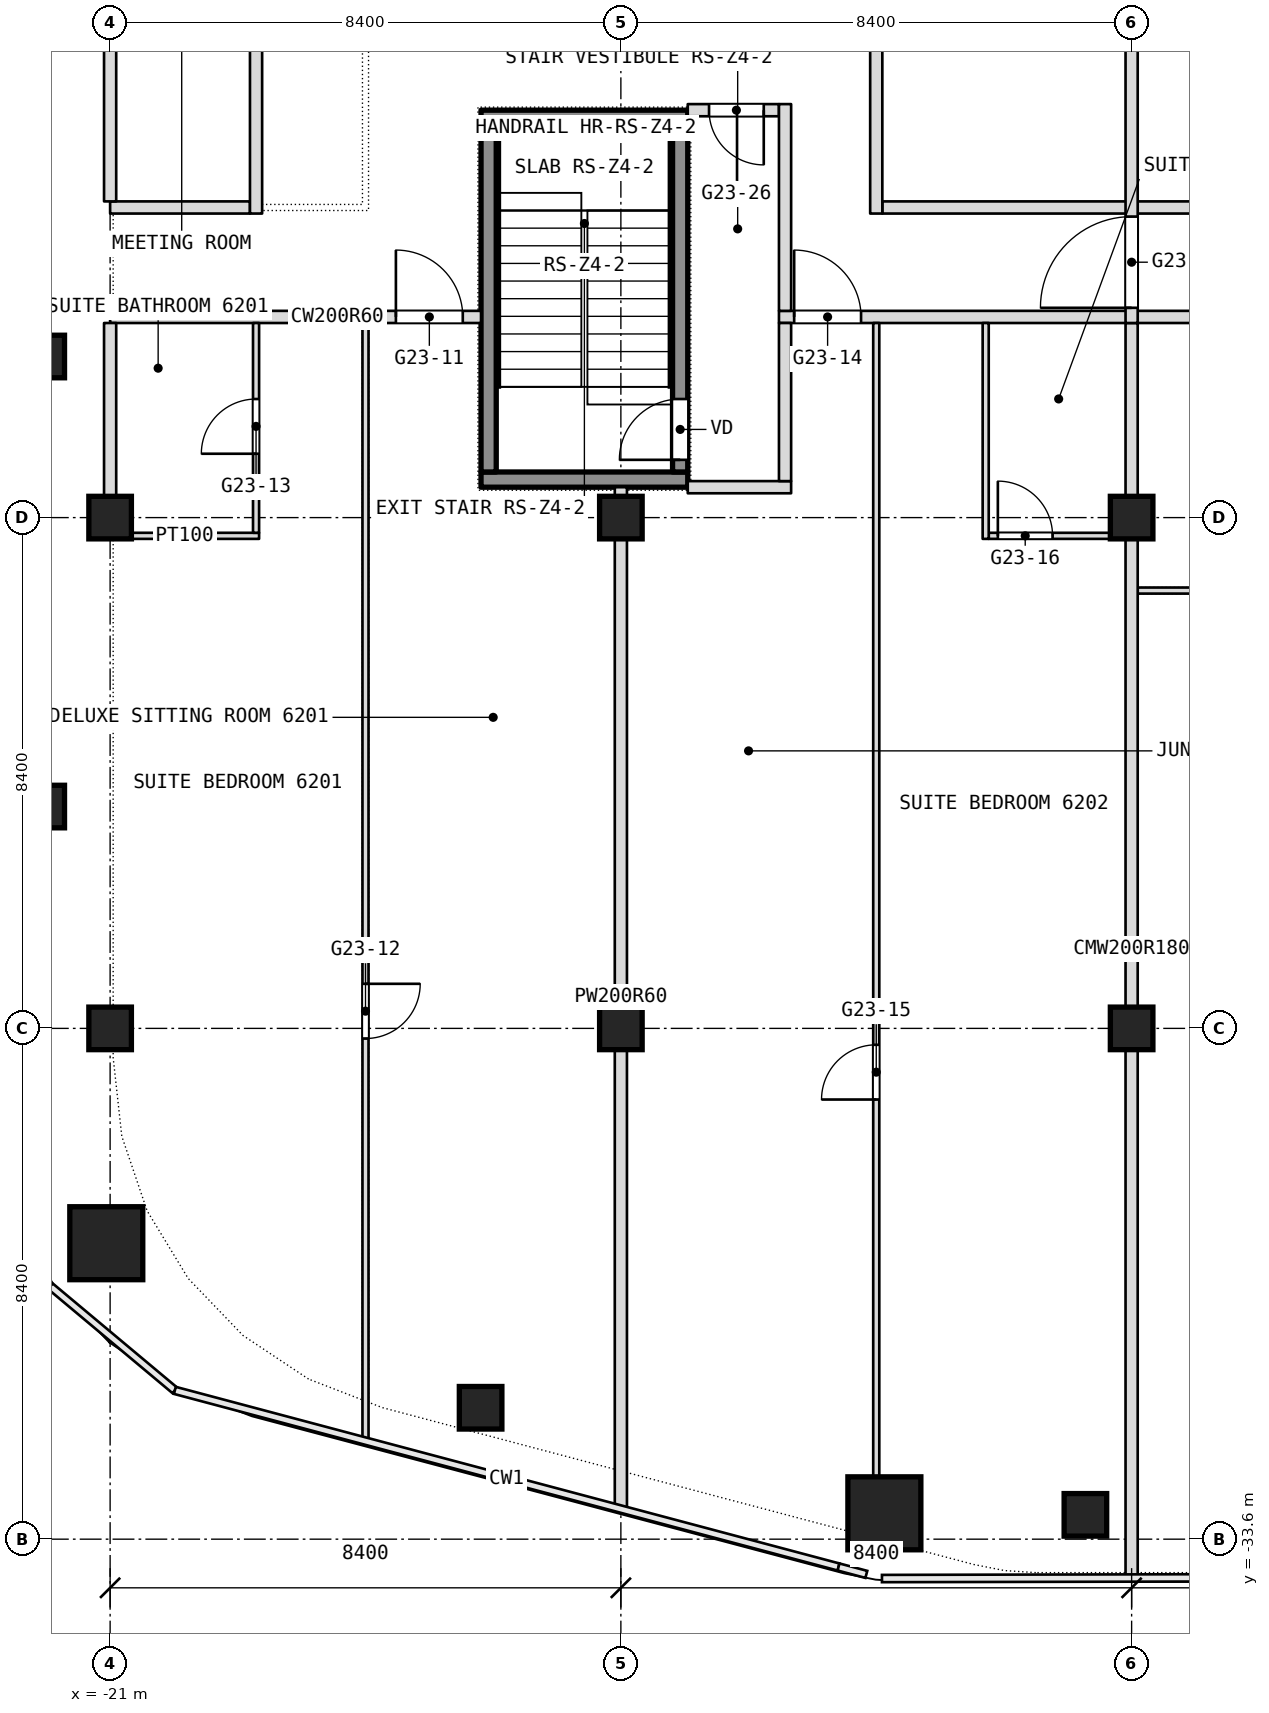
"""IFC4 building model, lengths in metres.
Left out: names, types, materials, properties, quantities, classifications, styles, units other than length and angle.
Written with IfcOpenShell. Run it as: python <this file> out.ifc"""

import sys

from ifc_helpers import new_model, si_unit, direction, frame, frame_2d, origin, origin_2d, place, context, subcontext, project, spatial, rectangle, extrude, element, fill, save


model = new_model("IFC4")
c1 = context("Model", 3, precision=1e-05, world=origin(), true_north=direction((0.0, 1.0)))
c2 = subcontext(c1, "Body", "Model", "MODEL_VIEW")
j1 = project(units=[si_unit("LENGTHUNIT", "METRE"), si_unit("PLANEANGLEUNIT", "RADIAN")], contexts=[c1])
p1 = place(None, origin())
s1 = spatial("IfcSite", under=j1, at=p1, CompositionType="ELEMENT")
p2 = place(p1, origin())
s2 = spatial("IfcBuilding", under=s1, at=p2, CompositionType="ELEMENT")
p3 = place(p2, frame((0.0, 0.0, 270.5)))
s3 = spatial("IfcBuildingStorey", under=s2, at=p3, CompositionType="ELEMENT", Elevation=270.5)
for number, where, z_axis, x_axis in (
    (1, (-21.063, -28.733, 0.0), (0.0, 0.0, 1.0), (1.0, 0.0, 0.0)),
    (2, (-8.266, -33.175, 0.0), (0.0, 0.0, 1.0), (1.0, 0.0, 0.0)),
):
    element("IfcColumn", number, at=place(p3, frame(where, z_axis=z_axis, x_axis=x_axis)), inside=s3, PredefinedType="COLUMN", context=c2, shape_type="SweptSolid", body=[
        extrude(rectangle(XDim=1.2, YDim=1.2, at=origin_2d()), origin(), (0.0, 0.0, 1.0), 3.6),
    ])
for number, where, z_axis, x_axis in (
    (3, (-21.0, -25.2, 0.0), (0.0, 0.0, 1.0), (1.0, 0.0, 0.0)),
    (4, (-21.0, -16.8, 0.0), (0.0, 0.0, 1.0), (1.0, 0.0, 0.0)),
    (5, (-12.6, -25.2, 0.0), (0.0, 0.0, 1.0), (1.0, 0.0, 0.0)),
    (6, (-12.6, -16.8, 0.0), (0.0, 0.0, 1.0), (1.0, 0.0, 0.0)),
    (7, (-4.2, -25.2, 0.0), (0.0, 0.0, 1.0), (1.0, 0.0, 0.0)),
    (8, (-4.2, -16.8, 0.0), (0.0, 0.0, 1.0), (1.0, 0.0, 0.0)),
    (9, (-22.1, -21.552, 0.0), (0.0, 0.0, 1.0), (1.0, 0.0, 0.0)),
    (10, (-22.1, -14.151, 0.0), (0.0, 0.0, 1.0), (1.0, 0.0, 0.0)),
    (11, (-4.96, -33.2, 0.0), (0.0, 0.0, 1.0), (1.0, 0.0, 0.0)),
    (12, (-14.907, -31.439, 0.0), (0.0, 0.0, 1.0), (1.0, 0.0, 0.0)),
):
    element("IfcColumn", number, at=place(p3, frame(where, z_axis=z_axis, x_axis=x_axis)), inside=s3, PredefinedType="COLUMN", context=c2, shape_type="SweptSolid", body=[
        extrude(rectangle(XDim=0.7, YDim=0.7, at=origin_2d()), origin(), (0.0, 0.0, 1.0), 3.6),
    ])
p4 = place(p3, frame((-4.1, -18.0, 0.0), z_axis=(0.0, 0.0, 1.0), x_axis=(1.0, 0.0, 0.0)))
e13 = element("IfcWall", 13, at=p4, inside=s3, PredefinedType="PARTITIONING", context=c2, shape_type="SweptSolid", body=[
    extrude(rectangle(XDim=3.55, YDim=0.1, at=frame_2d((1.775, 0.0))), origin(), (0.0, 0.0, 1.0), 3.34),
])
p5 = place(p3, frame((-21.0, -17.1, 0.0), z_axis=(0.0, 0.0, 1.0), x_axis=(1.0, 0.0, 0.0)))
e14 = element("IfcWall", 14, at=p5, inside=s3, PredefinedType="PARTITIONING", context=c2, shape_type="SweptSolid", body=[
    extrude(rectangle(XDim=2.45, YDim=0.1, at=frame_2d((1.225, 0.0))), origin(), (0.0, 0.0, 1.0), 3.34),
])
p6 = place(p3, frame((-6.55, -17.1, 0.0), z_axis=(0.0, 0.0, 1.0), x_axis=(1.0, 0.0, 0.0)))
e15 = element("IfcWall", 15, at=p6, inside=s3, PredefinedType="PARTITIONING", context=c2, shape_type="SweptSolid", body=[
    extrude(rectangle(XDim=2.45, YDim=0.1, at=frame_2d((1.225, 0.0))), origin(), (0.0, 0.0, 1.0), 3.34),
])
p7 = place(p6, frame((0.15, 0.0, 0.0)))
e16 = element("IfcOpeningElement", 16, at=p7, cuts=e15, PredefinedType="OPENING", context=c2, shape_type="SweptSolid", body=[
    extrude(rectangle(XDim=0.9, YDim=2.1, at=frame_2d((0.45, 1.05))), frame((0.0, 0.05, 0.0), z_axis=(0.0, -1.0, 0.0), x_axis=(1.0, 0.0, 0.0)), (0.0, 0.0, 1.0), 0.1),
])
p8 = place(p3, frame((-11.5, -16.3, 0.0), z_axis=(0.0, 0.0, 1.0), x_axis=(1.0, 0.0, 0.0)))
e17 = element("IfcWall", 17, at=p8, inside=s3, PredefinedType="PARTITIONING", context=c2, shape_type="SweptSolid", body=[
    extrude(rectangle(XDim=1.7, YDim=0.2, at=frame_2d((0.85, 0.0))), origin(), (0.0, 0.0, 1.0), 3.34),
])
p9 = place(p3, frame((-21.0, -13.5, 0.0), z_axis=(0.0, 0.0, 1.0), x_axis=(1.0, 0.0, 0.0)))
e18 = element("IfcWall", 18, at=p9, inside=s3, PredefinedType="PARTITIONING", context=c2, shape_type="SweptSolid", body=[
    extrude(rectangle(XDim=6.1, YDim=0.2, at=frame_2d((3.05, 0.0))), origin(), (0.0, 0.0, 1.0), 3.34),
])
p10 = place(p9, frame((4.7, 0.0, 0.0)))
e19 = element("IfcOpeningElement", 19, at=p10, cuts=e18, PredefinedType="OPENING", context=c2, shape_type="SweptSolid", body=[
    extrude(rectangle(XDim=1.1, YDim=2.1, at=frame_2d((0.55, 1.05))), frame((0.0, 0.1, 0.0), z_axis=(0.0, -1.0, 0.0), x_axis=(1.0, 0.0, 0.0)), (0.0, 0.0, 1.0), 0.2),
])
p11 = place(p3, frame((-10.0, -13.5, 0.0), z_axis=(0.0, 0.0, 1.0), x_axis=(1.0, 0.0, 0.0)))
e20 = element("IfcWall", 20, at=p11, inside=s3, PredefinedType="PARTITIONING", context=c2, shape_type="SweptSolid", body=[
    extrude(rectangle(XDim=16.0, YDim=0.2, at=frame_2d((8.0, 0.0))), origin(), (0.0, 0.0, 1.0), 3.34),
])
p12 = place(p11, frame((0.25, 0.0, 0.0)))
e21 = element("IfcOpeningElement", 21, at=p12, cuts=e20, PredefinedType="OPENING", context=c2, shape_type="SweptSolid", body=[
    extrude(rectangle(XDim=1.1, YDim=2.1, at=frame_2d((0.55, 1.05))), frame((0.0, 0.1, 0.0), z_axis=(0.0, -1.0, 0.0), x_axis=(1.0, 0.0, 0.0)), (0.0, 0.0, 1.0), 0.2),
])
p13 = place(p11, frame((9.5, 0.0, 0.0)))
e22 = element("IfcOpeningElement", 22, at=p13, cuts=e20, PredefinedType="OPENING", context=c2, shape_type="SweptSolid", body=[
    extrude(rectangle(XDim=1.1, YDim=2.1, at=frame_2d((0.55, 1.05))), frame((0.0, 0.1, 0.0), z_axis=(0.0, -1.0, 0.0), x_axis=(1.0, 0.0, 0.0)), (0.0, 0.0, 1.0), 0.2),
])
p14 = place(p3, frame((-21.0, -11.7, 0.0), z_axis=(0.0, 0.0, 1.0), x_axis=(1.0, 0.0, 0.0)))
e23 = element("IfcWall", 23, at=p14, inside=s3, PredefinedType="PARTITIONING", context=c2, shape_type="SweptSolid", body=[
    extrude(rectangle(XDim=2.3, YDim=0.2, at=frame_2d((1.15, 0.0))), origin(), (0.0, 0.0, 1.0), 3.34),
])
p15 = place(p3, frame((-8.3, -11.7, 0.0), z_axis=(0.0, 0.0, 1.0), x_axis=(1.0, 0.0, 0.0)))
e24 = element("IfcWall", 24, at=p15, inside=s3, PredefinedType="PARTITIONING", context=c2, shape_type="SweptSolid", body=[
    extrude(rectangle(XDim=25.0, YDim=0.2, at=frame_2d((12.5, 0.0))), origin(), (0.0, 0.0, 1.0), 3.34),
])
p16 = place(p3, frame((-11.5, -10.1, 0.0), z_axis=(0.0, 0.0, 1.0), x_axis=(1.0, 0.0, 0.0)))
e25 = element("IfcWall", 25, at=p16, inside=s3, PredefinedType="PARTITIONING", context=c2, shape_type="SweptSolid", body=[
    extrude(rectangle(XDim=1.5, YDim=0.2, at=frame_2d((0.75, 0.0))), origin(), (0.0, 0.0, 1.0), 3.34),
])
p17 = place(p16, frame((0.35, 0.0, 0.0)))
e26 = element("IfcOpeningElement", 26, at=p17, cuts=e25, PredefinedType="OPENING", context=c2, shape_type="SweptSolid", body=[
    extrude(rectangle(XDim=0.9, YDim=2.1, at=frame_2d((0.45, 1.05))), frame((0.0, 0.1, 0.0), z_axis=(0.0, -1.0, 0.0), x_axis=(1.0, 0.0, 0.0)), (0.0, 0.0, 1.0), 0.2),
])
p18 = place(p3, frame((-4.2, -34.2, 0.0), z_axis=(0.0, 0.0, 1.0), x_axis=(0.0, 1.0, 0.0)))
e27 = element("IfcWall", 27, at=p18, inside=s3, PredefinedType="PARTITIONING", context=c2, shape_type="SweptSolid", body=[
    extrude(rectangle(XDim=20.6, YDim=0.2, at=frame_2d((10.3, 0.0))), origin(), (0.0, 0.0, 1.0), 3.34),
])
p19 = place(p3, frame((-4.2, -13.6, 0.0), z_axis=(0.0, 0.0, 1.0), x_axis=(0.0, 1.0, 0.0)))
e28 = element("IfcWall", 28, at=p19, inside=s3, PredefinedType="PARTITIONING", context=c2, shape_type="SweptSolid", body=[
    extrude(rectangle(XDim=13.6, YDim=0.2, at=frame_2d((6.8, 0.0))), origin(), (0.0, 0.0, 1.0), 3.34),
])
p20 = place(p19, frame((11.95, 0.0, 0.0)))
e29 = element("IfcOpeningElement", 29, at=p20, cuts=e28, PredefinedType="OPENING", context=c2, shape_type="SweptSolid", body=[
    extrude(rectangle(XDim=1.5, YDim=2.1, at=frame_2d((0.75, 1.05))), frame((0.0, 0.1, 0.0), z_axis=(0.0, -1.0, 0.0), x_axis=(1.0, 0.0, 0.0)), (0.0, 0.0, 1.0), 0.2),
])
p21 = place(p19, frame((0.25, 0.0, 0.0)))
e30 = element("IfcOpeningElement", 30, at=p21, cuts=e28, PredefinedType="OPENING", context=c2, shape_type="SweptSolid", body=[
    extrude(rectangle(XDim=1.5, YDim=2.1, at=frame_2d((0.75, 1.05))), frame((0.0, 0.1, 0.0), z_axis=(0.0, -1.0, 0.0), x_axis=(1.0, 0.0, 0.0)), (0.0, 0.0, 1.0), 0.2),
])
p22 = place(p3, frame((-6.6, -17.15, 0.0), z_axis=(0.0, 0.0, 1.0), x_axis=(0.0, 1.0, 0.0)))
e31 = element("IfcWall", 31, at=p22, inside=s3, PredefinedType="PARTITIONING", context=c2, shape_type="SweptSolid", body=[
    extrude(rectangle(XDim=3.55, YDim=0.1, at=frame_2d((1.775, 0.0))), origin(), (0.0, 0.0, 1.0), 3.34),
])
p23 = place(p3, frame((-8.4, -32.575, 0.0), z_axis=(0.0, 0.0, 1.0), x_axis=(0.0, 1.0, 0.0)))
e32 = element("IfcWall", 32, at=p23, inside=s3, PredefinedType="PARTITIONING", context=c2, shape_type="SweptSolid", body=[
    extrude(rectangle(XDim=18.975, YDim=0.1, at=frame_2d((9.487, 0.0))), origin(), (0.0, 0.0, 1.0), 3.34),
])
p24 = place(p23, frame((6.205, 0.0, 0.0)))
e33 = element("IfcOpeningElement", 33, at=p24, cuts=e32, PredefinedType="OPENING", context=c2, shape_type="SweptSolid", body=[
    extrude(rectangle(XDim=0.9, YDim=2.1, at=frame_2d((0.45, 1.05))), frame((0.0, 0.05, 0.0), z_axis=(0.0, -1.0, 0.0), x_axis=(1.0, 0.0, 0.0)), (0.0, 0.0, 1.0), 0.1),
])
p25 = place(p3, frame((-8.4, -11.8, 0.0), z_axis=(0.0, 0.0, 1.0), x_axis=(0.0, 1.0, 0.0)))
e34 = element("IfcWall", 34, at=p25, inside=s3, PredefinedType="PARTITIONING", context=c2, shape_type="SweptSolid", body=[
    extrude(rectangle(XDim=3.1, YDim=0.2, at=frame_2d((1.55, 0.0))), origin(), (0.0, 0.0, 1.0), 3.34),
])
p26 = place(p3, frame((-9.9, -16.2, 0.0), z_axis=(0.0, 0.0, 1.0), x_axis=(0.0, 1.0, 0.0)))
e35 = element("IfcWall", 35, at=p26, inside=s3, PredefinedType="PARTITIONING", context=c2, shape_type="SweptSolid", body=[
    extrude(rectangle(XDim=2.6, YDim=0.2, at=frame_2d((1.3, 0.0))), origin(), (0.0, 0.0, 1.0), 3.34),
])
p27 = place(p3, frame((-9.9, -13.4, 0.0), z_axis=(0.0, 0.0, 1.0), x_axis=(0.0, 1.0, 0.0)))
e36 = element("IfcWall", 36, at=p27, inside=s3, PredefinedType="PARTITIONING", context=c2, shape_type="SweptSolid", body=[
    extrude(rectangle(XDim=3.4, YDim=0.2, at=frame_2d((1.7, 0.0))), origin(), (0.0, 0.0, 1.0), 3.34),
])
p28 = place(p3, frame((-12.6, -33.075, 0.0), z_axis=(0.0, 0.0, 1.0), x_axis=(0.0, 1.0, 0.0)))
e37 = element("IfcWall", 37, at=p28, inside=s3, PredefinedType="PARTITIONING", context=c2, shape_type="SweptSolid", body=[
    extrude(rectangle(XDim=16.775, YDim=0.2, at=frame_2d((8.387, 0.0))), origin(), (0.0, 0.0, 1.0), 3.34),
])
p29 = place(p3, frame((-16.8, -31.957, 0.0), z_axis=(0.0, 0.0, 1.0), x_axis=(0.0, 1.0, 0.0)))
e38 = element("IfcWall", 38, at=p29, inside=s3, PredefinedType="PARTITIONING", context=c2, shape_type="SweptSolid", body=[
    extrude(rectangle(XDim=18.357, YDim=0.1, at=frame_2d((9.178, 0.0))), origin(), (0.0, 0.0, 1.0), 3.34),
])
p30 = place(p29, frame((6.59, 0.0, 0.0)))
e39 = element("IfcOpeningElement", 39, at=p30, cuts=e38, PredefinedType="OPENING", context=c2, shape_type="SweptSolid", body=[
    extrude(rectangle(XDim=0.9, YDim=2.1, at=frame_2d((0.45, 1.05))), frame((0.0, 0.05, 0.0), z_axis=(0.0, -1.0, 0.0), x_axis=(1.0, 0.0, 0.0)), (0.0, 0.0, 1.0), 0.1),
])
p31 = place(p3, frame((-18.6, -17.05, 0.0), z_axis=(0.0, 0.0, 1.0), x_axis=(0.0, 1.0, 0.0)))
e40 = element("IfcWall", 40, at=p31, inside=s3, PredefinedType="PARTITIONING", context=c2, shape_type="SweptSolid", body=[
    extrude(rectangle(XDim=3.45, YDim=0.1, at=frame_2d((1.725, 0.0))), origin(), (0.0, 0.0, 1.0), 3.34),
])
p32 = place(p31, frame((1.3, 0.0, 0.0)))
e41 = element("IfcOpeningElement", 41, at=p32, cuts=e40, PredefinedType="OPENING", context=c2, shape_type="SweptSolid", body=[
    extrude(rectangle(XDim=0.9, YDim=2.1, at=frame_2d((0.45, 1.05))), frame((0.0, 0.05, 0.0), z_axis=(0.0, -1.0, 0.0), x_axis=(1.0, 0.0, 0.0)), (0.0, 0.0, 1.0), 0.1),
])
p33 = place(p3, frame((-18.6, -11.8, 0.0), z_axis=(0.0, 0.0, 1.0), x_axis=(0.0, 1.0, 0.0)))
e42 = element("IfcWall", 42, at=p33, inside=s3, PredefinedType="PARTITIONING", context=c2, shape_type="SweptSolid", body=[
    extrude(rectangle(XDim=27.336, YDim=0.2, at=frame_2d((13.668, 0.0))), origin(), (0.0, 0.0, 1.0), 3.34),
])
p34 = place(p33, frame((18.668, 0.0, 0.0)))
e43 = element("IfcOpeningElement", 43, at=p34, cuts=e42, PredefinedType="OPENING", context=c2, shape_type="SweptSolid", body=[
    extrude(rectangle(XDim=1.8, YDim=2.1, at=frame_2d((0.9, 1.05))), frame((0.0, 0.1, 0.0), z_axis=(0.0, -1.0, 0.0), x_axis=(1.0, 0.0, 0.0)), (0.0, 0.0, 1.0), 0.2),
])
p35 = place(p33, frame((5.45, 0.0, 0.0)))
e44 = element("IfcOpeningElement", 44, at=p35, cuts=e42, PredefinedType="OPENING", context=c2, shape_type="SweptSolid", body=[
    extrude(rectangle(XDim=1.0, YDim=2.1, at=frame_2d((0.5, 1.05))), frame((0.0, 0.1, 0.0), z_axis=(0.0, -1.0, 0.0), x_axis=(1.0, 0.0, 0.0)), (0.0, 0.0, 1.0), 0.2),
])
p36 = place(p3, frame((-21.0, -17.05, 0.0), z_axis=(0.0, 0.0, 1.0), x_axis=(0.0, 1.0, 0.0)))
e45 = element("IfcWall", 45, at=p36, inside=s3, PredefinedType="PARTITIONING", context=c2, shape_type="SweptSolid", body=[
    extrude(rectangle(XDim=3.45, YDim=0.2, at=frame_2d((1.725, 0.0))), origin(), (0.0, 0.0, 1.0), 3.34),
])
p37 = place(p3, frame((-21.0, -11.6, 0.0), z_axis=(0.0, 0.0, 1.0), x_axis=(0.0, 1.0, 0.0)))
e46 = element("IfcWall", 46, at=p37, inside=s3, PredefinedType="PARTITIONING", context=c2, shape_type="SweptSolid", body=[
    extrude(rectangle(XDim=11.5, YDim=0.2, at=frame_2d((5.75, 0.0))), origin(), (0.0, 0.0, 1.0), 3.34),
])
for number, where, z_axis, x_axis in (
    (47, (-14.9, -16.175, 0.1), (0.0, 0.0, 1.0), (1.0, 0.0, 0.0)),
    (48, (-14.9, -10.225, 0.1), (0.0, 0.0, 1.0), (1.0, 0.0, 0.0)),
):
    element("IfcWall", number, at=place(p3, frame(where, z_axis=z_axis, x_axis=x_axis)), inside=s3, PredefinedType="SHEAR", context=c2, shape_type="SweptSolid", body=[
        extrude(rectangle(XDim=3.4, YDim=0.25, at=frame_2d((1.7, 0.0))), origin(), (0.0, 0.0, 1.0), 3.6),
    ])
p38 = place(p3, frame((-14.775, -16.05, 0.1), z_axis=(0.0, 0.0, 1.0), x_axis=(0.0, 1.0, 0.0)))
e49 = element("IfcWall", 49, at=p38, inside=s3, PredefinedType="SHEAR", context=c2, shape_type="SweptSolid", body=[
    extrude(rectangle(XDim=5.7, YDim=0.25, at=frame_2d((2.85, 0.0))), origin(), (0.0, 0.0, 1.0), 3.6),
])
p39 = place(p3, frame((-11.625, -16.05, 0.1), z_axis=(0.0, 0.0, 1.0), x_axis=(0.0, 1.0, 0.0)))
e50 = element("IfcWall", 50, at=p39, inside=s3, PredefinedType="SHEAR", context=c2, shape_type="SweptSolid", body=[
    extrude(rectangle(XDim=5.7, YDim=0.25, at=frame_2d((2.85, 0.0))), origin(), (0.0, 0.0, 1.0), 3.6),
])
p40 = place(p39, frame((0.2, 0.0, 0.0)))
e51 = element("IfcOpeningElement", 51, at=p40, cuts=e50, PredefinedType="OPENING", context=c2, shape_type="SweptSolid", body=[
    extrude(rectangle(XDim=1.0, YDim=2.1, at=frame_2d((0.5, 1.05))), frame((0.0, 0.125, 0.0), z_axis=(0.0, -1.0, 0.0), x_axis=(1.0, 0.0, 0.0)), (0.0, 0.0, 1.0), 0.25),
])
p41 = place(p7, origin())
e52 = element("IfcDoor", 52, at=p41, inside=s3, OperationType="SINGLE_SWING_LEFT", PredefinedType="DOOR", context=c2, shape_type="SweptSolid", body=[
    extrude(rectangle(XDim=0.9, YDim=2.1, at=frame_2d((0.45, 1.05))), frame((0.0, 0.025, 0.0), z_axis=(0.0, -1.0, 0.0), x_axis=(1.0, 0.0, 0.0)), (0.0, 0.0, 1.0), 0.05),
])
fill(e16, e52)
p42 = place(p10, origin())
e53 = element("IfcDoor", 53, at=p42, inside=s3, OperationType="SINGLE_SWING_RIGHT", PredefinedType="DOOR", context=c2, shape_type="SweptSolid", body=[
    extrude(rectangle(XDim=1.1, YDim=2.1, at=frame_2d((0.55, 1.05))), frame((0.0, 0.025, 0.0), z_axis=(0.0, -1.0, 0.0), x_axis=(1.0, 0.0, 0.0)), (0.0, 0.0, 1.0), 0.05),
])
fill(e19, e53)
p43 = place(p12, origin())
e54 = element("IfcDoor", 54, at=p43, inside=s3, OperationType="SINGLE_SWING_RIGHT", PredefinedType="DOOR", context=c2, shape_type="SweptSolid", body=[
    extrude(rectangle(XDim=1.1, YDim=2.1, at=frame_2d((0.55, 1.05))), frame((0.0, 0.025, 0.0), z_axis=(0.0, -1.0, 0.0), x_axis=(1.0, 0.0, 0.0)), (0.0, 0.0, 1.0), 0.05),
])
fill(e21, e54)
p44 = place(p17, origin())
e55 = element("IfcDoor", 55, at=p44, inside=s3, OperationType="SINGLE_SWING_LEFT", PredefinedType="DOOR", context=c2, shape_type="SweptSolid", body=[
    extrude(rectangle(XDim=0.9, YDim=2.1, at=frame_2d((0.45, 1.05))), frame((0.0, 0.025, 0.0), z_axis=(0.0, -1.0, 0.0), x_axis=(1.0, 0.0, 0.0)), (0.0, 0.0, 1.0), 0.05),
])
fill(e26, e55)
p45 = place(p24, origin())
e56 = element("IfcDoor", 56, at=p45, inside=s3, OperationType="SINGLE_SWING_LEFT", PredefinedType="DOOR", context=c2, shape_type="SweptSolid", body=[
    extrude(rectangle(XDim=0.9, YDim=2.1, at=frame_2d((0.45, 1.05))), frame((0.0, 0.025, 0.0), z_axis=(0.0, -1.0, 0.0), x_axis=(1.0, 0.0, 0.0)), (0.0, 0.0, 1.0), 0.05),
])
fill(e33, e56)
p46 = place(p30, origin())
e57 = element("IfcDoor", 57, at=p46, inside=s3, OperationType="SINGLE_SWING_LEFT", PredefinedType="DOOR", context=c2, shape_type="SweptSolid", body=[
    extrude(rectangle(XDim=0.9, YDim=2.1, at=frame_2d((0.45, 1.05))), frame((0.0, 0.025, 0.0), z_axis=(0.0, -1.0, 0.0), x_axis=(1.0, 0.0, 0.0)), (0.0, 0.0, 1.0), 0.05),
])
fill(e39, e57)
p47 = place(p32, origin())
e58 = element("IfcDoor", 58, at=p47, inside=s3, OperationType="SINGLE_SWING_RIGHT", PredefinedType="DOOR", context=c2, shape_type="SweptSolid", body=[
    extrude(rectangle(XDim=0.9, YDim=2.1, at=frame_2d((0.45, 1.05))), frame((0.0, 0.025, 0.0), z_axis=(0.0, -1.0, 0.0), x_axis=(1.0, 0.0, 0.0)), (0.0, 0.0, 1.0), 0.05),
])
fill(e41, e58)
p48 = place(p40, origin())
e59 = element("IfcDoor", 59, at=p48, inside=s3, OperationType="SINGLE_SWING_LEFT", PredefinedType="DOOR", context=c2, shape_type="SweptSolid", body=[
    extrude(rectangle(XDim=1.0, YDim=2.1, at=frame_2d((0.5, 1.05))), frame((0.0, 0.025, 0.0), z_axis=(0.0, -1.0, 0.0), x_axis=(1.0, 0.0, 0.0)), (0.0, 0.0, 1.0), 0.05),
])
fill(e51, e59)
p49 = place(p21, origin())
e60 = element("IfcDoor", 60, at=p49, inside=s3, OperationType="DOUBLE_DOOR_DOUBLE_SWING", PredefinedType="DOOR", context=c2, shape_type="SweptSolid", body=[
    extrude(rectangle(XDim=1.5, YDim=2.1, at=frame_2d((0.75, 1.05))), frame((0.0, 0.025, 0.0), z_axis=(0.0, -1.0, 0.0), x_axis=(1.0, 0.0, 0.0)), (0.0, 0.0, 1.0), 0.05),
])
fill(e30, e60)
save(model, sys.argv[1])
